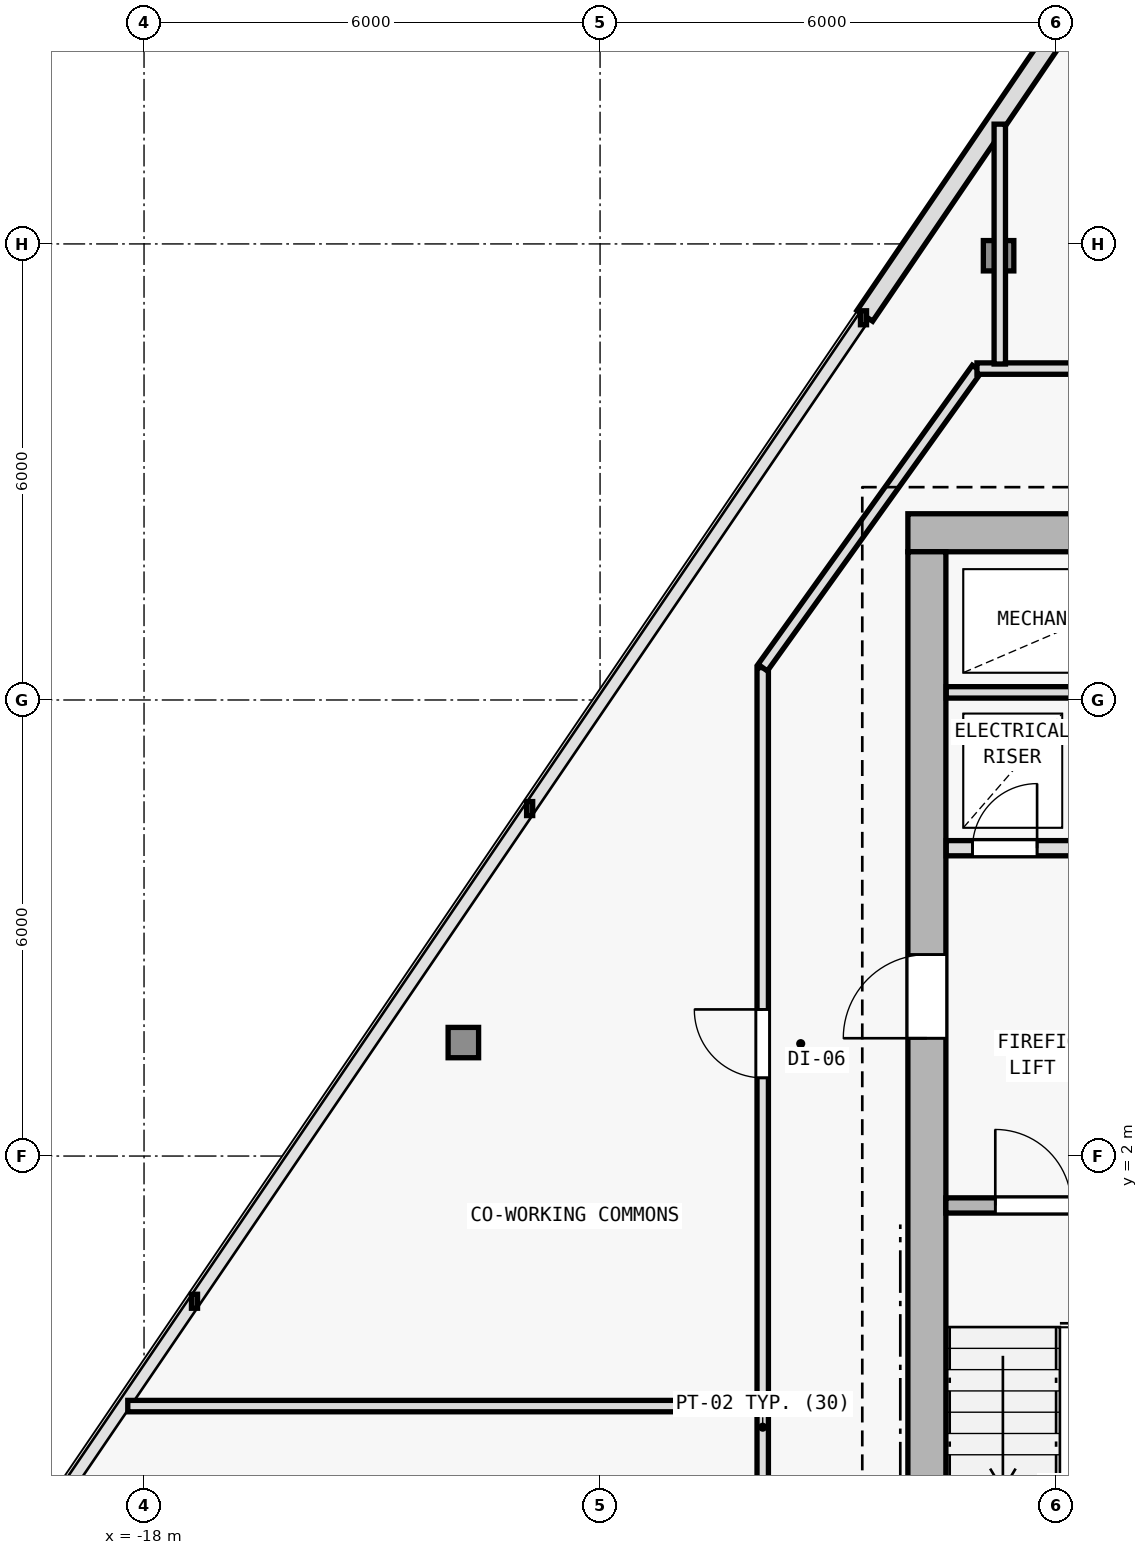
"""IFC4 building model, lengths in metres.
Left out: names, types, materials, properties, quantities, classifications, styles, units other than length and angle.
Written with IfcOpenShell. Run it as: python <this file> out.ifc"""

import sys

from ifc_helpers import new_model, si_unit, direction, frame, frame_2d, origin, origin_2d, place, context, subcontext, project, spatial, rectangle, i_section, extrude, element, fill, save


model = new_model("IFC4")
c1 = context("Model", 3, precision=1e-05, world=origin(), true_north=direction((0.0, 1.0)))
c2 = subcontext(c1, "Body", "Model", "MODEL_VIEW")
j1 = project(units=[si_unit("LENGTHUNIT", "METRE"), si_unit("PLANEANGLEUNIT", "RADIAN")], contexts=[c1])
p1 = place(None, origin())
s1 = spatial("IfcSite", under=j1, at=p1, CompositionType="ELEMENT")
p2 = place(p1, origin())
s2 = spatial("IfcBuilding", under=s1, at=p2, CompositionType="ELEMENT")
p3 = place(p2, frame((0.0, 0.0, 171.0)))
s3 = spatial("IfcBuildingStorey", under=s2, at=p3, CompositionType="ELEMENT", Elevation=171.0)
for number, where, z_axis, x_axis in (
    (1, (-7.7, 10.2, 0.0), (0.0, 0.0, 1.0), (1.0, 0.0, 0.0)),
    (2, (-7.7, 2.0, 0.0), (0.0, 0.0, 1.0), (1.0, 0.0, 0.0)),
):
    element("IfcColumn", number, at=place(p3, frame(where, z_axis=z_axis, x_axis=x_axis)), inside=s3, PredefinedType="COLUMN", context=c2, shape_type="SweptSolid", body=[
        extrude(i_section(OverallWidth=0.404, OverallDepth=0.407, WebThickness=0.017, FlangeThickness=0.028, FilletRadius=0.015, at=origin_2d()), origin(), (0.0, 0.0, 1.0), 3.6),
    ])
p4 = place(p3, frame((-6.757, 13.844, 0.006), z_axis=(0.00877514453, -0.002516901919, 0.999958330153), x_axis=(0.275705143097, 0.961242255662, 0.0)))
e3 = element("IfcColumn", 3, at=p4, inside=s3, PredefinedType="COLUMN", context=c2, shape_type="SweptSolid", body=[
    extrude(i_section(OverallWidth=0.401, OverallDepth=0.399, WebThickness=0.016, FlangeThickness=0.025, FilletRadius=0.015, at=origin_2d()), origin(), (0.0, 0.0, 1.0), 3.589),
])
p5 = place(p3, frame((-13.799, 3.493, 0.006), z_axis=(0.017003572908, 0.009522000828, 0.999810086971), x_axis=(-0.488603368932, 0.87250601595, 0.0)))
e4 = element("IfcColumn", 4, at=p5, inside=s3, PredefinedType="COLUMN", context=c2, shape_type="SweptSolid", body=[
    extrude(i_section(OverallWidth=0.401, OverallDepth=0.399, WebThickness=0.016, FlangeThickness=0.025, FilletRadius=0.015, at=origin_2d()), origin(), (0.0, 0.0, 1.0), 3.59),
])
p6 = place(p3, frame((-8.517, 13.053, 0.0), z_axis=(0.0, 0.0, 1.0), x_axis=(0.562463961516, 0.826821801838, 0.0)))
e5 = element("IfcWall", 5, at=p6, inside=s3, PredefinedType="SOLIDWALL", context=c2, shape_type="SweptSolid", body=[
    extrude(rectangle(XDim=11.018, YDim=0.25, at=frame_2d((5.509, 0.0))), origin(), (0.0, 0.0, 1.0), 3.35),
])
p7 = place(p6, frame((4.609, 0.0, 0.62)))
e6 = element("IfcOpeningElement", 6, at=p7, cuts=e5, PredefinedType="OPENING", context=c2, shape_type="SweptSolid", body=[
    extrude(rectangle(XDim=1.8, YDim=2.1, at=frame_2d((0.9, 1.05))), frame((0.0, 0.135, 0.0), z_axis=(0.0, -1.0, 0.0), x_axis=(1.0, 0.0, 0.0)), (0.0, 0.0, 1.0), 0.27),
])
p8 = place(p3, frame((7.95, 10.2, 0.0), z_axis=(0.0, 0.0, 1.0), x_axis=(-1.0, 0.0, 0.0)))
e7 = element("IfcWall", 7, at=p8, inside=s3, PredefinedType="SHEAR", context=c2, shape_type="SweptSolid", body=[
    extrude(rectangle(XDim=15.9, YDim=0.5, at=frame_2d((7.95, 0.0))), origin(), (0.0, 0.0, 1.0), 3.35),
])
p9 = place(p8, frame((4.4, 0.0, 0.0)))
e8 = element("IfcOpeningElement", 8, at=p9, cuts=e7, PredefinedType="OPENING", context=c2, shape_type="SweptSolid", body=[
    extrude(rectangle(XDim=1.1, YDim=2.15, at=frame_2d((0.55, 1.075))), frame((0.0, 0.26, 0.0), z_axis=(0.0, -1.0, 0.0), x_axis=(1.0, 0.0, 0.0)), (0.0, 0.0, 1.0), 0.52),
])
p10 = place(p3, frame((-7.7, -9.15, 0.0), z_axis=(0.0, 0.0, 1.0), x_axis=(0.0, 1.0, 0.0)))
e9 = element("IfcWall", 9, at=p10, inside=s3, PredefinedType="SHEAR", context=c2, shape_type="SweptSolid", body=[
    extrude(rectangle(XDim=19.1, YDim=0.5, at=frame_2d((9.55, 0.0))), origin(), (0.0, 0.0, 1.0), 3.35),
])
p11 = place(p10, frame((12.7, 0.0, 0.0)))
e10 = element("IfcOpeningElement", 10, at=p11, cuts=e9, PredefinedType="OPENING", context=c2, shape_type="SweptSolid", body=[
    extrude(rectangle(XDim=1.1, YDim=2.15, at=frame_2d((0.55, 1.075))), frame((0.0, 0.26, 0.0), z_axis=(0.0, -1.0, 0.0), x_axis=(1.0, 0.0, 0.0)), (0.0, 0.0, 1.0), 0.52),
])
p12 = place(p3, frame((-7.45, 1.35, 0.0), z_axis=(0.0, 0.0, 1.0), x_axis=(1.0, 0.0, 0.0)))
e11 = element("IfcWall", 11, at=p12, inside=s3, PredefinedType="SOLIDWALL", context=c2, shape_type="SweptSolid", body=[
    extrude(rectangle(XDim=3.4, YDim=0.2, at=frame_2d((1.7, 0.0))), origin(), (0.0, 0.0, 1.0), 3.35),
])
p13 = place(p12, frame((0.65, 0.0, 0.0)))
e12 = element("IfcOpeningElement", 12, at=p13, cuts=e11, PredefinedType="OPENING", context=c2, shape_type="SweptSolid", body=[
    extrude(rectangle(XDim=1.0, YDim=2.15, at=frame_2d((0.5, 1.075))), frame((0.0, 0.11, 0.0), z_axis=(0.0, -1.0, 0.0), x_axis=(1.0, 0.0, 0.0)), (0.0, 0.0, 1.0), 0.22),
])
p14 = place(p3, frame((-7.445, 6.05, 0.0), z_axis=(0.0, 0.0, 1.0), x_axis=(1.0, 0.0, 0.0)))
e13 = element("IfcWall", 13, at=p14, inside=s3, PredefinedType="SOLIDWALL", context=c2, shape_type="SweptSolid", body=[
    extrude(rectangle(XDim=3.595, YDim=0.2, at=frame_2d((1.797, 0.0))), origin(), (0.0, 0.0, 1.0), 3.35),
])
p15 = place(p14, frame((0.345, 0.0, 0.0)))
e14 = element("IfcOpeningElement", 14, at=p15, cuts=e13, PredefinedType="OPENING", context=c2, shape_type="SweptSolid", body=[
    extrude(rectangle(XDim=0.85, YDim=2.1, at=frame_2d((0.425, 1.05))), frame((0.0, 0.11, 0.0), z_axis=(0.0, -1.0, 0.0), x_axis=(1.0, 0.0, 0.0)), (0.0, 0.0, 1.0), 0.22),
])
p16 = place(p14, frame((2.145, 0.0, 0.0)))
e15 = element("IfcOpeningElement", 15, at=p16, cuts=e13, PredefinedType="OPENING", context=c2, shape_type="SweptSolid", body=[
    extrude(rectangle(XDim=0.85, YDim=2.1, at=frame_2d((0.425, 1.05))), frame((0.0, 0.11, 0.0), z_axis=(0.0, -1.0, 0.0), x_axis=(1.0, 0.0, 0.0)), (0.0, 0.0, 1.0), 0.22),
])
p17 = place(p3, frame((-7.445, 8.1, 0.0), z_axis=(0.0, 0.0, 1.0), x_axis=(1.0, 0.0, 0.0)))
e16 = element("IfcWall", 16, at=p17, inside=s3, PredefinedType="PARTITIONING", context=c2, shape_type="SweptSolid", body=[
    extrude(rectangle(XDim=3.595, YDim=0.15, at=frame_2d((1.797, 0.0))), origin(), (0.0, 0.0, 1.0), 3.35),
])
p18 = place(p3, frame((-9.86, -11.56, 0.0), z_axis=(0.0, 0.0, 1.0), x_axis=(0.0, 1.0, 0.0)))
e17 = element("IfcWall", 17, at=p18, inside=s3, PredefinedType="PARTITIONING", context=c2, shape_type="SweptSolid", body=[
    extrude(rectangle(XDim=19.986, YDim=0.15, at=frame_2d((9.993, 0.0))), origin(), (0.0, 0.0, 1.0), 2.825),
])
p19 = place(p18, frame((4.774, 0.0, 0.0)))
e18 = element("IfcOpeningElement", 18, at=p19, cuts=e17, PredefinedType="OPENING", context=c2, shape_type="SweptSolid", body=[
    extrude(rectangle(XDim=0.9, YDim=2.1, at=frame_2d((0.45, 1.05))), frame((0.0, 0.085, 0.0), z_axis=(0.0, -1.0, 0.0), x_axis=(1.0, 0.0, 0.0)), (0.0, 0.0, 1.0), 0.17),
])
p20 = place(p18, frame((14.589, 0.0, 0.0)))
e19 = element("IfcOpeningElement", 19, at=p20, cuts=e17, PredefinedType="OPENING", context=c2, shape_type="SweptSolid", body=[
    extrude(rectangle(XDim=0.9, YDim=2.1, at=frame_2d((0.45, 1.05))), frame((0.0, 0.085, 0.0), z_axis=(0.0, -1.0, 0.0), x_axis=(1.0, 0.0, 0.0)), (0.0, 0.0, 1.0), 0.17),
])
p21 = place(p3, frame((-9.86, 8.426, 0.0), z_axis=(0.0, 0.0, 1.0), x_axis=(0.582449511476, 0.812866881218, 0.0)))
e20 = element("IfcWall", 20, at=p21, inside=s3, PredefinedType="PARTITIONING", context=c2, shape_type="SweptSolid", body=[
    extrude(rectangle(XDim=4.84, YDim=0.15, at=frame_2d((2.42, 0.0))), origin(), (0.0, 0.0, 1.0), 2.965),
])
p22 = place(p3, frame((-7.041, 12.36, 0.0), z_axis=(0.0, 0.0, 1.0), x_axis=(1.0, 0.0, 0.0)))
e21 = element("IfcWall", 21, at=p22, inside=s3, PredefinedType="PARTITIONING", context=c2, shape_type="SweptSolid", body=[
    extrude(rectangle(XDim=14.064, YDim=0.15, at=frame_2d((7.032, 0.0))), origin(), (0.0, 0.0, 1.0), 2.965),
])
p23 = place(p22, frame((12.833, 0.0, 0.0)))
e22 = element("IfcOpeningElement", 22, at=p23, cuts=e21, PredefinedType="OPENING", context=c2, shape_type="SweptSolid", body=[
    extrude(rectangle(XDim=0.85, YDim=2.1, at=frame_2d((0.425, 1.05))), frame((0.0, 0.085, 0.0), z_axis=(0.0, -1.0, 0.0), x_axis=(1.0, 0.0, 0.0)), (0.0, 0.0, 1.0), 0.17),
])
p24 = place(p22, frame((10.357, 0.0, 0.0)))
e23 = element("IfcOpeningElement", 23, at=p24, cuts=e21, PredefinedType="OPENING", context=c2, shape_type="SweptSolid", body=[
    extrude(rectangle(XDim=0.9, YDim=2.1, at=frame_2d((0.45, 1.05))), frame((0.0, 0.085, 0.0), z_axis=(0.0, -1.0, 0.0), x_axis=(1.0, 0.0, 0.0)), (0.0, 0.0, 1.0), 0.17),
])
p25 = place(p22, frame((4.167, 0.0, 0.0)))
e24 = element("IfcOpeningElement", 24, at=p25, cuts=e21, PredefinedType="OPENING", context=c2, shape_type="SweptSolid", body=[
    extrude(rectangle(XDim=0.9, YDim=2.1, at=frame_2d((0.45, 1.05))), frame((0.0, 0.085, 0.0), z_axis=(0.0, -1.0, 0.0), x_axis=(1.0, 0.0, 0.0)), (0.0, 0.0, 1.0), 0.17),
])
p26 = place(p3, frame((-6.741, 12.42, 0.0), z_axis=(0.0, 0.0, 1.0), x_axis=(0.0, 1.0, 0.0)))
e25 = element("IfcWall", 25, at=p26, inside=s3, PredefinedType="PARTITIONING", context=c2, shape_type="SweptSolid", body=[
    extrude(rectangle(XDim=3.156, YDim=0.15, at=frame_2d((1.578, 0.0))), origin(), (0.0, 0.0, 1.0), 2.935),
])
p27 = place(p3, frame((-9.92, -1.29, 0.0), z_axis=(0.0, 0.0, 1.0), x_axis=(-1.0, 0.0, 0.0)))
e26 = element("IfcWall", 26, at=p27, inside=s3, PredefinedType="PARTITIONING", context=c2, shape_type="SweptSolid", body=[
    extrude(rectangle(XDim=8.294, YDim=0.15, at=frame_2d((4.147, 0.0))), origin(), (0.0, 0.0, 1.0), 2.775),
])
p28 = place(p11, origin())
e27 = element("IfcDoor", 27, at=p28, inside=s3, OperationType="SINGLE_SWING_LEFT", PredefinedType="DOOR", context=c2, shape_type="SweptSolid", body=[
    extrude(rectangle(XDim=1.1, YDim=2.15, at=frame_2d((0.55, 1.075))), frame((0.0, 0.025, 0.0), z_axis=(0.0, -1.0, 0.0), x_axis=(1.0, 0.0, 0.0)), (0.0, 0.0, 1.0), 0.05),
])
fill(e10, e27)
p29 = place(p13, origin())
e28 = element("IfcDoor", 28, at=p29, inside=s3, OperationType="SINGLE_SWING_LEFT", PredefinedType="DOOR", context=c2, shape_type="SweptSolid", body=[
    extrude(rectangle(XDim=1.0, YDim=2.15, at=frame_2d((0.5, 1.075))), frame((0.0, 0.025, 0.0), z_axis=(0.0, -1.0, 0.0), x_axis=(1.0, 0.0, 0.0)), (0.0, 0.0, 1.0), 0.05),
])
fill(e12, e28)
p30 = place(p15, origin())
e29 = element("IfcDoor", 29, at=p30, inside=s3, OperationType="SINGLE_SWING_RIGHT", PredefinedType="DOOR", context=c2, shape_type="SweptSolid", body=[
    extrude(rectangle(XDim=0.85, YDim=2.1, at=frame_2d((0.425, 1.05))), frame((0.0, 0.025, 0.0), z_axis=(0.0, -1.0, 0.0), x_axis=(1.0, 0.0, 0.0)), (0.0, 0.0, 1.0), 0.05),
])
fill(e14, e29)
p31 = place(p20, origin())
e30 = element("IfcDoor", 30, at=p31, inside=s3, OperationType="SINGLE_SWING_RIGHT", PredefinedType="DOOR", context=c2, shape_type="SweptSolid", body=[
    extrude(rectangle(XDim=0.9, YDim=2.1, at=frame_2d((0.45, 1.05))), frame((0.0, 0.025, 0.0), z_axis=(0.0, -1.0, 0.0), x_axis=(1.0, 0.0, 0.0)), (0.0, 0.0, 1.0), 0.05),
])
fill(e19, e30)
save(model, sys.argv[1])
